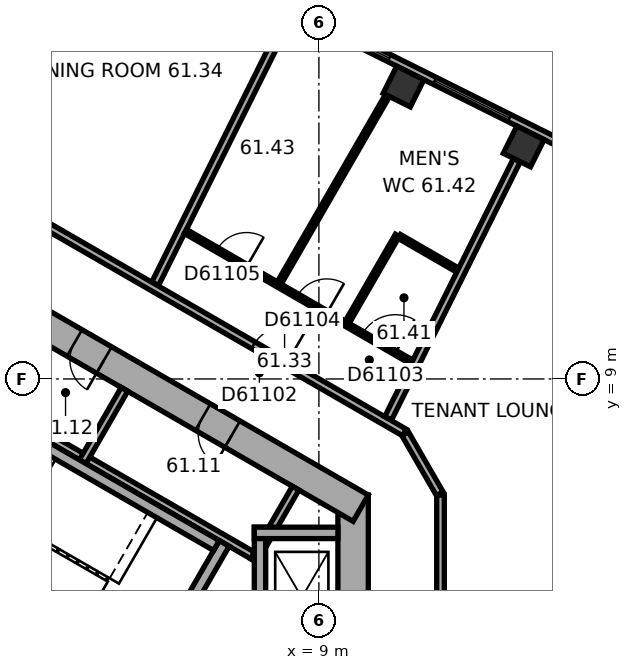
"""IFC4 building model, lengths in metres.
Left out: names, types, materials, properties, quantities, classifications, styles, units other than length and angle.
Written with IfcOpenShell. Run it as: python <this file> out.ifc"""

import sys

from ifc_helpers import new_model, si_unit, direction, frame, frame_2d, origin, origin_2d, place, context, subcontext, project, spatial, rectangle, extrude, element, fill, save


model = new_model("IFC4")
c1 = context("Model", 3, precision=1e-05, world=origin(), true_north=direction((0.0, 1.0)))
c2 = subcontext(c1, "Body", "Model", "MODEL_VIEW")
j1 = project(units=[si_unit("LENGTHUNIT", "METRE"), si_unit("PLANEANGLEUNIT", "RADIAN")], contexts=[c1])
p1 = place(None, origin())
s1 = spatial("IfcSite", under=j1, at=p1, CompositionType="ELEMENT")
p2 = place(p1, origin())
s2 = spatial("IfcBuilding", under=s1, at=p2, CompositionType="ELEMENT")
p3 = place(p2, frame((0.0, 0.0, 247.6)))
s3 = spatial("IfcBuildingStorey", under=s2, at=p3, CompositionType="ELEMENT", Elevation=247.6)
for number, where, z_axis, x_axis in (
    (1, (14.389, 15.118, 0.0), (0.0, 0.0, 1.0), (-0.895, 0.446, 0.0)),
    (2, (11.227, 16.695, 0.0), (0.0, 0.0, 1.0), (-0.895, 0.446, 0.0)),
):
    element("IfcColumn", number, at=place(p3, frame(where, z_axis=z_axis, x_axis=x_axis)), inside=s3, PredefinedType="COLUMN", context=c2, shape_type="SweptSolid", body=[
        extrude(rectangle(XDim=0.8, YDim=0.8, at=origin_2d()), origin(), (0.0, 0.0, 1.0), 3.7),
    ])
p4 = place(p3, frame((9.9, -5.947, 0.0), z_axis=(0.0, 0.0, 1.0), x_axis=(0.0, 1.0, 0.0)))
e3 = element("IfcWall", 3, at=p4, inside=s3, PredefinedType="SHEAR", context=c2, shape_type="SweptSolid", body=[
    extrude(rectangle(XDim=11.894, YDim=0.8, at=frame_2d((5.947, 0.0))), origin(), (0.0, 0.0, 1.0), 3.7),
])
p5 = place(p4, frame((6.147, 0.0, 0.0)))
e4 = element("IfcOpeningElement", 4, at=p5, cuts=e3, PredefinedType="OPENING", context=c2, shape_type="SweptSolid", body=[
    extrude(rectangle(XDim=1.5, YDim=2.1, at=frame_2d((0.75, 1.05))), frame((0.0, 0.41, 0.0), z_axis=(0.0, -1.0, 0.0), x_axis=(1.0, 0.0, 0.0)), (0.0, 0.0, 1.0), 0.82),
])
p6 = place(p4, frame((1.697, 0.0, 0.0)))
e5 = element("IfcOpeningElement", 5, at=p6, cuts=e3, PredefinedType="OPENING", context=c2, shape_type="SweptSolid", body=[
    extrude(rectangle(XDim=0.9, YDim=2.1, at=frame_2d((0.45, 1.05))), frame((0.0, 0.41, 0.0), z_axis=(0.0, -1.0, 0.0), x_axis=(1.0, 0.0, 0.0)), (0.0, 0.0, 1.0), 0.82),
])
p7 = place(p4, frame((4.297, 0.0, 0.0)))
e6 = element("IfcOpeningElement", 6, at=p7, cuts=e3, PredefinedType="OPENING", context=c2, shape_type="SweptSolid", body=[
    extrude(rectangle(XDim=0.9, YDim=2.1, at=frame_2d((0.45, 1.05))), frame((0.0, 0.41, 0.0), z_axis=(0.0, -1.0, 0.0), x_axis=(1.0, 0.0, 0.0)), (0.0, 0.0, 1.0), 0.82),
])
p8 = place(p3, frame((10.1, 5.6, 0.0), z_axis=(0.0, 0.0, 1.0), x_axis=(-0.866023897231, 0.500002609418, 0.0)))
e7 = element("IfcWall", 7, at=p8, inside=s3, PredefinedType="SHEAR", context=c2, shape_type="SweptSolid", body=[
    extrude(rectangle(XDim=11.894, YDim=0.8, at=frame_2d((5.947, 0.0))), origin(), (0.0, 0.0, 1.0), 3.7),
])
p9 = place(p8, frame((3.897, 0.0, 0.0)))
e8 = element("IfcOpeningElement", 8, at=p9, cuts=e7, PredefinedType="OPENING", context=c2, shape_type="SweptSolid", body=[
    extrude(rectangle(XDim=0.9, YDim=2.1, at=frame_2d((0.45, 1.05))), frame((0.0, 0.41, 0.0), z_axis=(0.0, -1.0, 0.0), x_axis=(1.0, 0.0, 0.0)), (0.0, 0.0, 1.0), 0.82),
])
p10 = place(p8, frame((7.797, 0.0, 0.0)))
e9 = element("IfcOpeningElement", 9, at=p10, cuts=e7, PredefinedType="OPENING", context=c2, shape_type="SweptSolid", body=[
    extrude(rectangle(XDim=0.9, YDim=2.1, at=frame_2d((0.45, 1.05))), frame((0.0, 0.41, 0.0), z_axis=(0.0, -1.0, 0.0), x_axis=(1.0, 0.0, 0.0)), (0.0, 0.0, 1.0), 0.82),
])
p11 = place(p3, frame((18.299, 13.727, 0.0), z_axis=(0.0, 0.0, 1.0), x_axis=(-0.894934554817, 0.44619742558, 0.0)))
e10 = element("IfcWall", 10, at=p11, inside=s3, PredefinedType="STANDARD", context=c2, shape_type="SweptSolid", body=[
    extrude(rectangle(XDim=18.841, YDim=0.2, at=frame_2d((9.421, 0.0))), origin(), (0.0, 0.0, 1.0), 3.7),
])
p12 = place(p11, frame((1.253, 0.0, 0.9)))
e11 = element("IfcOpeningElement", 11, at=p12, cuts=e10, PredefinedType="OPENING", context=c2, shape_type="SweptSolid", body=[
    extrude(rectangle(XDim=2.2, YDim=2.0, at=frame_2d((1.1, 1.0))), frame((0.0, 0.11, 0.0), z_axis=(0.0, -1.0, 0.0), x_axis=(1.0, 0.0, 0.0)), (0.0, 0.0, 1.0), 0.22),
])
p13 = place(p11, frame((4.786, 0.0, 0.9)))
e12 = element("IfcOpeningElement", 12, at=p13, cuts=e10, PredefinedType="OPENING", context=c2, shape_type="SweptSolid", body=[
    extrude(rectangle(XDim=2.2, YDim=2.0, at=frame_2d((1.1, 1.0))), frame((0.0, 0.11, 0.0), z_axis=(0.0, -1.0, 0.0), x_axis=(1.0, 0.0, 0.0)), (0.0, 0.0, 1.0), 0.22),
])
p14 = place(p11, frame((8.32, 0.0, 0.9)))
e13 = element("IfcOpeningElement", 13, at=p14, cuts=e10, PredefinedType="OPENING", context=c2, shape_type="SweptSolid", body=[
    extrude(rectangle(XDim=2.2, YDim=2.0, at=frame_2d((1.1, 1.0))), frame((0.0, 0.11, 0.0), z_axis=(0.0, -1.0, 0.0), x_axis=(1.0, 0.0, 0.0)), (0.0, 0.0, 1.0), 0.22),
])
p15 = place(p11, frame((11.854, 0.0, 0.9)))
e14 = element("IfcOpeningElement", 14, at=p15, cuts=e10, PredefinedType="OPENING", context=c2, shape_type="SweptSolid", body=[
    extrude(rectangle(XDim=2.2, YDim=2.0, at=frame_2d((1.1, 1.0))), frame((0.0, 0.11, 0.0), z_axis=(0.0, -1.0, 0.0), x_axis=(1.0, 0.0, 0.0)), (0.0, 0.0, 1.0), 0.22),
])
p16 = place(p11, frame((15.387, 0.0, 0.9)))
e15 = element("IfcOpeningElement", 15, at=p16, cuts=e10, PredefinedType="OPENING", context=c2, shape_type="SweptSolid", body=[
    extrude(rectangle(XDim=2.2, YDim=2.0, at=frame_2d((1.1, 1.0))), frame((0.0, 0.11, 0.0), z_axis=(0.0, -1.0, 0.0), x_axis=(1.0, 0.0, 0.0)), (0.0, 0.0, 1.0), 0.22),
])
p17 = place(p3, frame((7.424, 4.259, 0.0), z_axis=(0.0, 0.0, 1.0), x_axis=(-0.866026010844, 0.49999894854, 0.0)))
e16 = element("IfcWall", 16, at=p17, inside=s3, PredefinedType="PARTITIONING", context=c2, shape_type="SweptSolid", body=[
    extrude(rectangle(XDim=8.0, YDim=0.2, at=frame_2d((4.0, 0.0))), origin(), (0.0, 0.0, 1.0), 3.42),
])
for number, where, z_axis, x_axis in (
    (17, (7.287, 4.222, 0.0), (0.0, 0.0, 1.0), (0.5, 0.866, 0.0)),
    (18, (2.784, 6.822, 0.0), (0.0, 0.0, 1.0), (0.5, 0.866, 0.0)),
):
    element("IfcWall", number, at=place(p3, frame(where, z_axis=z_axis, x_axis=x_axis)), inside=s3, PredefinedType="PARTITIONING", context=c2, shape_type="SweptSolid", body=[
        extrude(rectangle(XDim=2.2, YDim=0.2, at=frame_2d((1.1, 0.0))), origin(), (0.0, 0.0, 1.0), 3.42),
    ])
p18 = place(p3, frame((4.158, 0.602, 0.0), z_axis=(0.0, 0.0, 1.0), x_axis=(0.499977259774, 0.866038532462, 0.0)))
e19 = element("IfcWall", 19, at=p18, inside=s3, PredefinedType="SHEAR", context=c2, shape_type="SweptSolid", body=[
    extrude(rectangle(XDim=4.7, YDim=0.3, at=frame_2d((2.35, 0.0))), origin(), (0.0, 0.0, 1.0), 3.42),
])
p19 = place(p18, frame((0.8, 0.0, 0.0)))
e20 = element("IfcOpeningElement", 20, at=p19, cuts=e19, PredefinedType="OPENING", context=c2, shape_type="SweptSolid", body=[
    extrude(rectangle(XDim=1.2, YDim=2.1, at=frame_2d((0.6, 1.05))), frame((0.0, 0.16, 0.0), z_axis=(0.0, -1.0, 0.0), x_axis=(1.0, 0.0, 0.0)), (0.0, 0.0, 1.0), 0.32),
])
for number, where, z_axis, x_axis in (
    (21, (4.103, 0.807, 0.0), (0.0, 0.0, 1.0), (-0.866, 0.5, 0.0)),
    (22, (6.303, 4.617, 0.0), (0.0, 0.0, 1.0), (-0.866, 0.5, 0.0)),
):
    element("IfcWall", number, at=place(p3, frame(where, z_axis=z_axis, x_axis=x_axis)), inside=s3, PredefinedType="SHEAR", context=c2, shape_type="SweptSolid", body=[
        extrude(rectangle(XDim=7.06, YDim=0.3, at=frame_2d((3.53, 0.0))), origin(), (0.0, 0.0, 1.0), 3.42),
    ])
p20 = place(p3, frame((7.45, 1.75, 0.0), z_axis=(0.0, 0.0, 1.0), x_axis=(0.0, 1.0, 0.0)))
e23 = element("IfcWall", 23, at=p20, inside=s3, PredefinedType="SHEAR", context=c2, shape_type="SweptSolid", body=[
    extrude(rectangle(XDim=3.35, YDim=0.3, at=frame_2d((1.675, 0.0))), origin(), (0.0, 0.0, 1.0), 3.42),
])
p21 = place(p3, frame((7.3, 4.95, 0.0), z_axis=(0.0, 0.0, 1.0), x_axis=(1.0, 0.0, 0.0)))
e24 = element("IfcWall", 24, at=p21, inside=s3, PredefinedType="SHEAR", context=c2, shape_type="SweptSolid", body=[
    extrude(rectangle(XDim=2.2, YDim=0.3, at=frame_2d((1.1, 0.0))), origin(), (0.0, 0.0, 1.0), 3.42),
])
p22 = place(p3, frame((7.886, 17.913, 0.0), z_axis=(0.0, 0.0, 1.0), x_axis=(-0.446204015428, -0.894931269213, 0.0)))
e25 = element("IfcWall", 25, at=p22, inside=s3, PredefinedType="PARTITIONING", context=c2, shape_type="SweptSolid", body=[
    extrude(rectangle(XDim=7.16, YDim=0.2, at=frame_2d((3.58, 0.0))), origin(), (0.0, 0.0, 1.0), 3.42),
])
p23 = place(p3, frame((10.805, 16.458, 0.0), z_axis=(0.0, 0.0, 1.0), x_axis=(-0.500025478307, -0.866010693377, 0.0)))
e26 = element("IfcWall", 26, at=p23, inside=s3, PredefinedType="PARTITIONING", context=c2, shape_type="SweptSolid", body=[
    extrude(rectangle(XDim=5.696, YDim=0.12, at=frame_2d((2.848, 0.0))), origin(), (0.0, 0.0, 1.0), 2.87),
])
p24 = place(p3, frame((11.065, 12.78, 0.0), z_axis=(0.0, 0.0, 1.0), x_axis=(-0.499938597367, -0.866060851709, 0.0)))
e27 = element("IfcWall", 27, at=p24, inside=s3, PredefinedType="PARTITIONING", context=c2, shape_type="SweptSolid", body=[
    extrude(rectangle(XDim=2.64, YDim=0.12, at=frame_2d((1.32, 0.0))), origin(), (0.0, 0.0, 1.0), 3.42),
])
p25 = place(p3, frame((11.25, 7.592, 0.0), z_axis=(0.0, 0.0, 1.0), x_axis=(-0.866024037175, 0.500002367029, 0.0)))
e28 = element("IfcWall", 28, at=p25, inside=s3, PredefinedType="PARTITIONING", context=c2, shape_type="SweptSolid", body=[
    extrude(rectangle(XDim=11.854, YDim=0.2, at=frame_2d((5.927, 0.0))), origin(), (0.0, 0.0, 1.0), 3.42),
])
p26 = place(p25, frame((3.59, 0.0, 0.0)))
e29 = element("IfcOpeningElement", 29, at=p26, cuts=e28, PredefinedType="OPENING", context=c2, shape_type="SweptSolid", body=[
    extrude(rectangle(XDim=1.0, YDim=2.1, at=frame_2d((0.5, 1.05))), frame((0.0, 0.11, 0.0), z_axis=(0.0, -1.0, 0.0), x_axis=(1.0, 0.0, 0.0)), (0.0, 0.0, 1.0), 0.22),
])
p27 = place(p3, frame((11.447, 9.441, 0.0), z_axis=(0.0, 0.0, 1.0), x_axis=(-0.866016001002, 0.500016285743, 0.0)))
e30 = element("IfcWall", 30, at=p27, inside=s3, PredefinedType="PARTITIONING", context=c2, shape_type="SweptSolid", body=[
    extrude(rectangle(XDim=6.881, YDim=0.12, at=frame_2d((3.44, 0.0))), origin(), (0.0, 0.0, 1.0), 3.42),
])
p28 = place(p27, frame((0.5, 0.0, 0.0)))
e31 = element("IfcOpeningElement", 31, at=p28, cuts=e30, PredefinedType="OPENING", context=c2, shape_type="SweptSolid", body=[
    extrude(rectangle(XDim=1.0, YDim=2.1, at=frame_2d((0.5, 1.05))), frame((0.0, 0.07, 0.0), z_axis=(0.0, -1.0, 0.0), x_axis=(1.0, 0.0, 0.0)), (0.0, 0.0, 1.0), 0.14),
])
p29 = place(p27, frame((2.583, 0.0, 0.0)))
e32 = element("IfcOpeningElement", 32, at=p29, cuts=e30, PredefinedType="OPENING", context=c2, shape_type="SweptSolid", body=[
    extrude(rectangle(XDim=0.9, YDim=2.1, at=frame_2d((0.45, 1.05))), frame((0.0, 0.07, 0.0), z_axis=(0.0, -1.0, 0.0), x_axis=(1.0, 0.0, 0.0)), (0.0, 0.0, 1.0), 0.14),
])
p30 = place(p27, frame((5.023, 0.0, 0.0)))
e33 = element("IfcOpeningElement", 33, at=p30, cuts=e30, PredefinedType="OPENING", context=c2, shape_type="SweptSolid", body=[
    extrude(rectangle(XDim=0.9, YDim=2.1, at=frame_2d((0.45, 1.05))), frame((0.0, 0.07, 0.0), z_axis=(0.0, -1.0, 0.0), x_axis=(1.0, 0.0, 0.0)), (0.0, 0.0, 1.0), 0.14),
])
p31 = place(p3, frame((12.18, 5.981, 0.0), z_axis=(0.0, 0.0, 1.0), x_axis=(-0.499904359745, 0.86608061467, 0.0)))
e34 = element("IfcWall", 34, at=p31, inside=s3, PredefinedType="PARTITIONING", context=c2, shape_type="SweptSolid", body=[
    extrude(rectangle(XDim=1.82, YDim=0.2, at=frame_2d((0.91, 0.0))), origin(), (0.0, 0.0, 1.0), 3.42),
])
p32 = place(p3, frame((12.2, 2.598, 0.0), z_axis=(0.0, 0.0, 1.0), x_axis=(0.0, 1.0, 0.0)))
e35 = element("IfcWall", 35, at=p32, inside=s3, PredefinedType="PARTITIONING", context=c2, shape_type="SweptSolid", body=[
    extrude(rectangle(XDim=3.349, YDim=0.2, at=frame_2d((1.674, 0.0))), origin(), (0.0, 0.0, 1.0), 3.42),
])
p33 = place(p3, frame((12.654, 11.862, 0.0), z_axis=(0.0, 0.0, 1.0), x_axis=(-0.866025242659, 0.500000279077, 0.0)))
e36 = element("IfcWall", 36, at=p33, inside=s3, PredefinedType="PARTITIONING", context=c2, shape_type="SweptSolid", body=[
    extrude(rectangle(XDim=1.775, YDim=0.12, at=frame_2d((0.887, 0.0))), origin(), (0.0, 0.0, 1.0), 3.42),
])
p34 = place(p3, frame((14.211, 14.76, 0.0), z_axis=(0.0, 0.0, 1.0), x_axis=(-0.446197176117, -0.894934679195, 0.0)))
e37 = element("IfcWall", 37, at=p34, inside=s3, PredefinedType="PARTITIONING", context=c2, shape_type="SweptSolid", body=[
    extrude(rectangle(XDim=7.592, YDim=0.2, at=frame_2d((3.796, 0.0))), origin(), (0.0, 0.0, 1.0), 3.42),
])
p35 = place(p13, origin())
e38 = element("IfcWindow", 38, at=p35, inside=s3, PartitioningType="SINGLE_PANEL", PredefinedType="WINDOW", context=c2, shape_type="SweptSolid", body=[
    extrude(rectangle(XDim=2.2, YDim=2.0, at=frame_2d((1.1, 1.0))), frame((0.0, 0.03, 0.0), z_axis=(0.0, -1.0, 0.0), x_axis=(1.0, 0.0, 0.0)), (0.0, 0.0, 1.0), 0.06),
])
fill(e12, e38)
p36 = place(p14, origin())
e39 = element("IfcWindow", 39, at=p36, inside=s3, PartitioningType="SINGLE_PANEL", PredefinedType="WINDOW", context=c2, shape_type="SweptSolid", body=[
    extrude(rectangle(XDim=2.2, YDim=2.0, at=frame_2d((1.1, 1.0))), frame((0.0, 0.03, 0.0), z_axis=(0.0, -1.0, 0.0), x_axis=(1.0, 0.0, 0.0)), (0.0, 0.0, 1.0), 0.06),
])
fill(e13, e39)
p37 = place(p9, origin())
e40 = element("IfcDoor", 40, at=p37, inside=s3, OperationType="SINGLE_SWING_LEFT", PredefinedType="DOOR", context=c2, shape_type="SweptSolid", body=[
    extrude(rectangle(XDim=0.9, YDim=2.1, at=frame_2d((0.45, 1.05))), frame((0.0, 0.025, 0.0), z_axis=(0.0, -1.0, 0.0), x_axis=(1.0, 0.0, 0.0)), (0.0, 0.0, 1.0), 0.05),
])
fill(e8, e40)
p38 = place(p10, origin())
e41 = element("IfcDoor", 41, at=p38, inside=s3, OperationType="SINGLE_SWING_LEFT", PredefinedType="DOOR", context=c2, shape_type="SweptSolid", body=[
    extrude(rectangle(XDim=0.9, YDim=2.1, at=frame_2d((0.45, 1.05))), frame((0.0, 0.025, 0.0), z_axis=(0.0, -1.0, 0.0), x_axis=(1.0, 0.0, 0.0)), (0.0, 0.0, 1.0), 0.05),
])
fill(e9, e41)
p39 = place(p26, origin())
e42 = element("IfcDoor", 42, at=p39, inside=s3, OperationType="SINGLE_SWING_LEFT", PredefinedType="DOOR", context=c2, shape_type="SweptSolid", body=[
    extrude(rectangle(XDim=1.0, YDim=2.1, at=frame_2d((0.5, 1.05))), frame((0.0, 0.025, 0.0), z_axis=(0.0, -1.0, 0.0), x_axis=(1.0, 0.0, 0.0)), (0.0, 0.0, 1.0), 0.05),
])
fill(e29, e42)
p40 = place(p28, origin())
e43 = element("IfcDoor", 43, at=p40, inside=s3, OperationType="SINGLE_SWING_LEFT", PredefinedType="DOOR", context=c2, shape_type="SweptSolid", body=[
    extrude(rectangle(XDim=1.0, YDim=2.1, at=frame_2d((0.5, 1.05))), frame((0.0, 0.025, 0.0), z_axis=(0.0, -1.0, 0.0), x_axis=(1.0, 0.0, 0.0)), (0.0, 0.0, 1.0), 0.05),
])
fill(e31, e43)
p41 = place(p29, origin())
e44 = element("IfcDoor", 44, at=p41, inside=s3, OperationType="SINGLE_SWING_LEFT", PredefinedType="DOOR", context=c2, shape_type="SweptSolid", body=[
    extrude(rectangle(XDim=0.9, YDim=2.1, at=frame_2d((0.45, 1.05))), frame((0.0, 0.025, 0.0), z_axis=(0.0, -1.0, 0.0), x_axis=(1.0, 0.0, 0.0)), (0.0, 0.0, 1.0), 0.05),
])
fill(e32, e44)
p42 = place(p30, origin())
e45 = element("IfcDoor", 45, at=p42, inside=s3, OperationType="SINGLE_SWING_LEFT", PredefinedType="DOOR", context=c2, shape_type="SweptSolid", body=[
    extrude(rectangle(XDim=0.9, YDim=2.1, at=frame_2d((0.45, 1.05))), frame((0.0, 0.025, 0.0), z_axis=(0.0, -1.0, 0.0), x_axis=(1.0, 0.0, 0.0)), (0.0, 0.0, 1.0), 0.05),
])
fill(e33, e45)
save(model, sys.argv[1])
